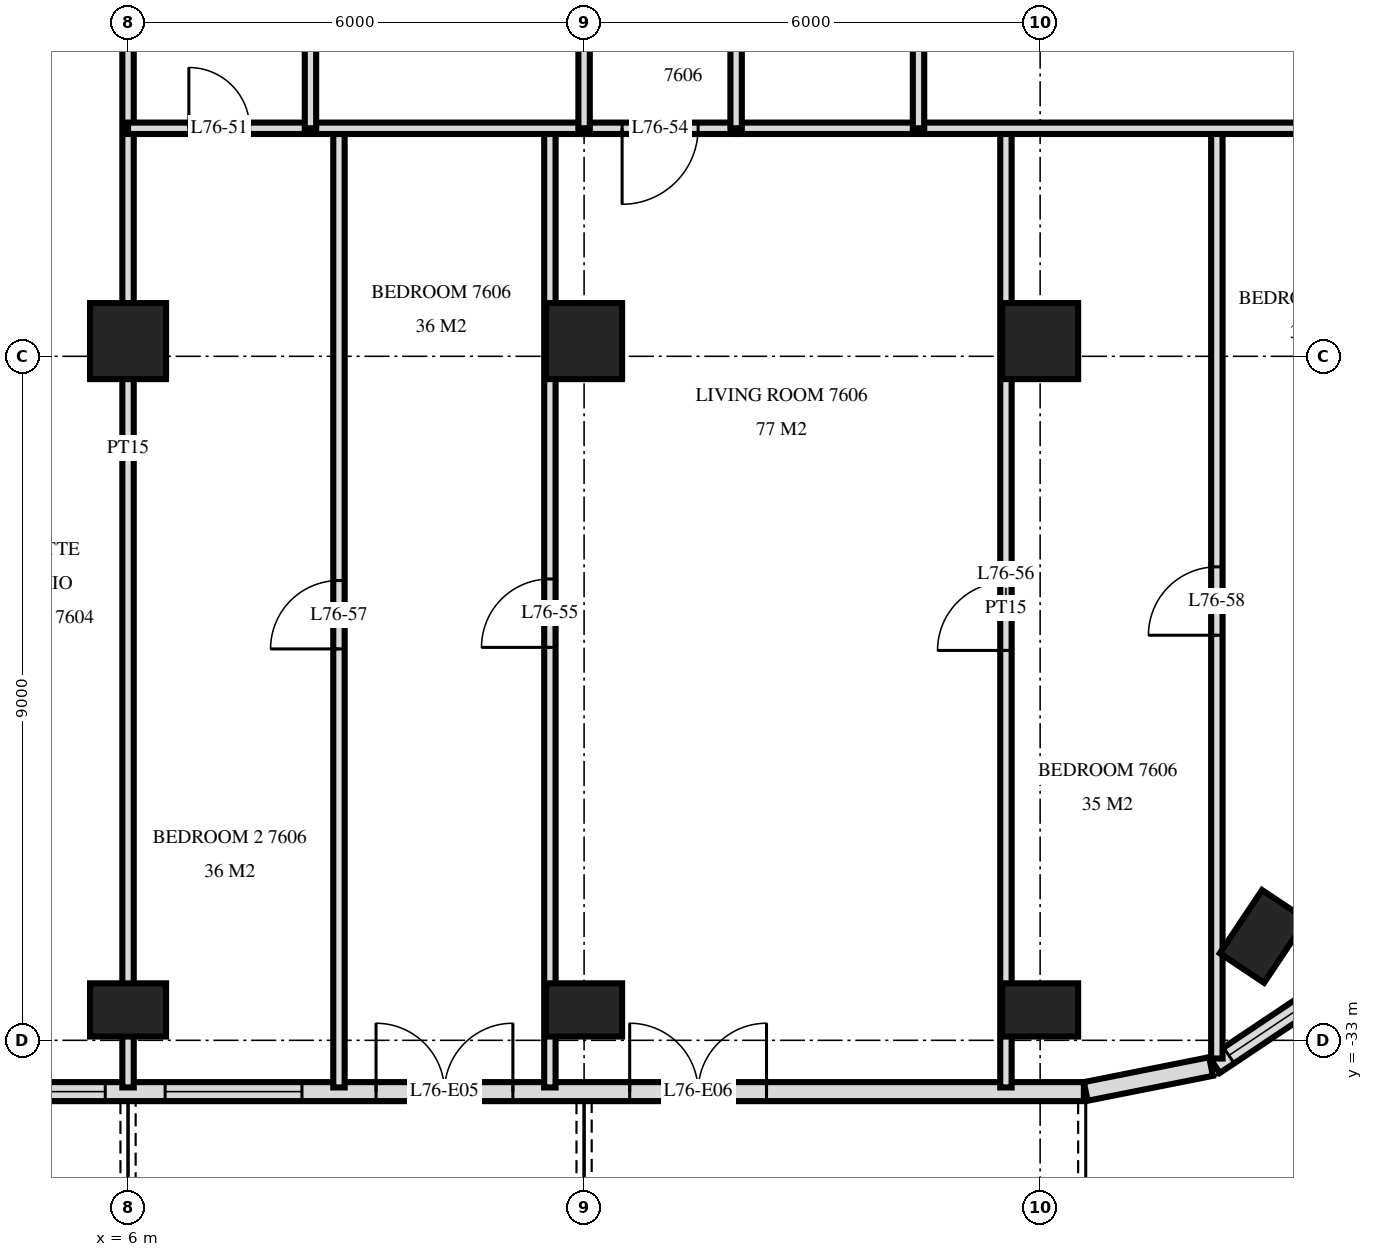
"""IFC4 building model, lengths in metres.
Left out: names, types, materials, properties, quantities, classifications, styles, units other than length and angle.
Written with IfcOpenShell. Run it as: python <this file> out.ifc"""

import sys

from ifc_helpers import new_model, si_unit, direction, frame, frame_2d, origin, origin_2d, place, context, subcontext, project, spatial, rectangle, extrude, element, fill, save


model = new_model("IFC4")
c1 = context("Model", 3, precision=1e-05, world=origin(), true_north=direction((0.0, 1.0)))
c2 = subcontext(c1, "Body", "Model", "MODEL_VIEW")
j1 = project(units=[si_unit("LENGTHUNIT", "METRE"), si_unit("PLANEANGLEUNIT", "RADIAN")], contexts=[c1])
p1 = place(None, origin())
s1 = spatial("IfcSite", under=j1, at=p1, CompositionType="ELEMENT")
p2 = place(p1, origin())
s2 = spatial("IfcBuilding", under=s1, at=p2, CompositionType="ELEMENT")
p3 = place(p2, frame((0.0, 0.0, 287.6)))
s3 = spatial("IfcBuildingStorey", under=s2, at=p3, CompositionType="ELEMENT", Elevation=287.6)
p4 = place(p3, frame((6.0, -32.6, 0.0), z_axis=(0.0, 0.0, 1.0), x_axis=(1.0, 0.0, 0.0)))
e1 = element("IfcColumn", 1, at=p4, inside=s3, PredefinedType="COLUMN", context=c2, shape_type="SweptSolid", body=[
    extrude(rectangle(XDim=1.0, YDim=0.7, at=origin_2d()), origin(), (0.0, 0.0, 1.0), 3.5),
])
p5 = place(p3, frame((6.0, -23.8, 0.0), z_axis=(0.0, 0.0, 1.0), x_axis=(1.0, 0.0, 0.0)))
e2 = element("IfcColumn", 2, at=p5, inside=s3, PredefinedType="COLUMN", context=c2, shape_type="SweptSolid", body=[
    extrude(rectangle(XDim=1.0, YDim=1.0, at=origin_2d()), origin(), (0.0, 0.0, 1.0), 3.5),
])
p6 = place(p3, frame((12.0, -32.6, 0.0), z_axis=(0.0, 0.0, 1.0), x_axis=(1.0, 0.0, 0.0)))
e3 = element("IfcColumn", 3, at=p6, inside=s3, PredefinedType="COLUMN", context=c2, shape_type="SweptSolid", body=[
    extrude(rectangle(XDim=1.0, YDim=0.7, at=origin_2d()), origin(), (0.0, 0.0, 1.0), 3.5),
])
p7 = place(p3, frame((12.0, -23.8, 0.0), z_axis=(0.0, 0.0, 1.0), x_axis=(1.0, 0.0, 0.0)))
e4 = element("IfcColumn", 4, at=p7, inside=s3, PredefinedType="COLUMN", context=c2, shape_type="SweptSolid", body=[
    extrude(rectangle(XDim=1.0, YDim=1.0, at=origin_2d()), origin(), (0.0, 0.0, 1.0), 3.5),
])
p8 = place(p3, frame((18.0, -32.6, 0.0), z_axis=(0.0, 0.0, 1.0), x_axis=(1.0, 0.0, 0.0)))
e5 = element("IfcColumn", 5, at=p8, inside=s3, PredefinedType="COLUMN", context=c2, shape_type="SweptSolid", body=[
    extrude(rectangle(XDim=1.0, YDim=0.7, at=origin_2d()), origin(), (0.0, 0.0, 1.0), 3.5),
])
p9 = place(p3, frame((18.0, -23.8, 0.0), z_axis=(0.0, 0.0, 1.0), x_axis=(1.0, 0.0, 0.0)))
e6 = element("IfcColumn", 6, at=p9, inside=s3, PredefinedType="COLUMN", context=c2, shape_type="SweptSolid", body=[
    extrude(rectangle(XDim=1.0, YDim=1.0, at=origin_2d()), origin(), (0.0, 0.0, 1.0), 3.5),
])
p10 = place(p3, frame((20.933, -31.633, 0.0), z_axis=(0.0, 0.0, 1.0), x_axis=(0.555584744817, 0.831459915646, 0.0)))
e7 = element("IfcColumn", 7, at=p10, inside=s3, PredefinedType="COLUMN", context=c2, shape_type="SweptSolid", body=[
    extrude(rectangle(XDim=1.0, YDim=0.7, at=origin_2d()), origin(), (0.0, 0.0, 1.0), 3.5),
])
p11 = place(p3, frame((-18.575, -33.675, 0.0), z_axis=(0.0, 0.0, 1.0), x_axis=(1.0, 0.0, 0.0)))
e8 = element("IfcWall", 8, at=p11, inside=s3, PredefinedType="SOLIDWALL", context=c2, shape_type="SweptSolid", body=[
    extrude(rectangle(XDim=37.151, YDim=0.25, at=frame_2d((18.575, 0.0))), origin(), (0.0, 0.0, 1.0), 3.22),
])
p12 = place(p11, frame((1.175, 0.0, 0.0)))
e9 = element("IfcOpeningElement", 9, at=p12, cuts=e8, PredefinedType="OPENING", context=c2, shape_type="SweptSolid", body=[
    extrude(rectangle(XDim=1.8, YDim=2.4, at=frame_2d((0.9, 1.2))), frame((0.0, 0.135, 0.0), z_axis=(0.0, -1.0, 0.0), x_axis=(1.0, 0.0, 0.0)), (0.0, 0.0, 1.0), 0.27),
])
p13 = place(p11, frame((4.4, 0.0, 0.9)))
e10 = element("IfcOpeningElement", 10, at=p13, cuts=e8, PredefinedType="OPENING", context=c2, shape_type="SweptSolid", body=[
    extrude(rectangle(XDim=1.8, YDim=1.5, at=frame_2d((0.9, 0.75))), frame((0.0, 0.135, 0.0), z_axis=(0.0, -1.0, 0.0), x_axis=(1.0, 0.0, 0.0)), (0.0, 0.0, 1.0), 0.27),
])
p14 = place(p11, frame((6.875, 0.0, 0.9)))
e11 = element("IfcOpeningElement", 11, at=p14, cuts=e8, PredefinedType="OPENING", context=c2, shape_type="SweptSolid", body=[
    extrude(rectangle(XDim=2.4, YDim=1.5, at=frame_2d((1.2, 0.75))), frame((0.0, 0.135, 0.0), z_axis=(0.0, -1.0, 0.0), x_axis=(1.0, 0.0, 0.0)), (0.0, 0.0, 1.0), 0.27),
])
p15 = place(p11, frame((10.175, 0.0, 0.0)))
e12 = element("IfcOpeningElement", 12, at=p15, cuts=e8, PredefinedType="OPENING", context=c2, shape_type="SweptSolid", body=[
    extrude(rectangle(XDim=1.8, YDim=2.4, at=frame_2d((0.9, 1.2))), frame((0.0, 0.135, 0.0), z_axis=(0.0, -1.0, 0.0), x_axis=(1.0, 0.0, 0.0)), (0.0, 0.0, 1.0), 0.27),
])
p16 = place(p11, frame((13.175, 0.0, 0.0)))
e13 = element("IfcOpeningElement", 13, at=p16, cuts=e8, PredefinedType="OPENING", context=c2, shape_type="SweptSolid", body=[
    extrude(rectangle(XDim=1.8, YDim=2.4, at=frame_2d((0.9, 1.2))), frame((0.0, 0.135, 0.0), z_axis=(0.0, -1.0, 0.0), x_axis=(1.0, 0.0, 0.0)), (0.0, 0.0, 1.0), 0.27),
])
p17 = place(p11, frame((15.875, 0.0, 0.9)))
e14 = element("IfcOpeningElement", 14, at=p17, cuts=e8, PredefinedType="OPENING", context=c2, shape_type="SweptSolid", body=[
    extrude(rectangle(XDim=2.4, YDim=1.5, at=frame_2d((1.2, 0.75))), frame((0.0, 0.135, 0.0), z_axis=(0.0, -1.0, 0.0), x_axis=(1.0, 0.0, 0.0)), (0.0, 0.0, 1.0), 0.27),
])
p18 = place(p11, frame((19.175, 0.0, 0.0)))
e15 = element("IfcOpeningElement", 15, at=p18, cuts=e8, PredefinedType="OPENING", context=c2, shape_type="SweptSolid", body=[
    extrude(rectangle(XDim=1.8, YDim=2.4, at=frame_2d((0.9, 1.2))), frame((0.0, 0.135, 0.0), z_axis=(0.0, -1.0, 0.0), x_axis=(1.0, 0.0, 0.0)), (0.0, 0.0, 1.0), 0.27),
])
p19 = place(p11, frame((21.875, 0.0, 0.9)))
e16 = element("IfcOpeningElement", 16, at=p19, cuts=e8, PredefinedType="OPENING", context=c2, shape_type="SweptSolid", body=[
    extrude(rectangle(XDim=2.4, YDim=1.5, at=frame_2d((1.2, 0.75))), frame((0.0, 0.135, 0.0), z_axis=(0.0, -1.0, 0.0), x_axis=(1.0, 0.0, 0.0)), (0.0, 0.0, 1.0), 0.27),
])
p20 = place(p11, frame((25.063, 0.0, 0.9)))
e17 = element("IfcOpeningElement", 17, at=p20, cuts=e8, PredefinedType="OPENING", context=c2, shape_type="SweptSolid", body=[
    extrude(rectangle(XDim=1.8, YDim=1.5, at=frame_2d((0.9, 0.75))), frame((0.0, 0.135, 0.0), z_axis=(0.0, -1.0, 0.0), x_axis=(1.0, 0.0, 0.0)), (0.0, 0.0, 1.0), 0.27),
])
p21 = place(p11, frame((27.838, 0.0, 0.0)))
e18 = element("IfcOpeningElement", 18, at=p21, cuts=e8, PredefinedType="OPENING", context=c2, shape_type="SweptSolid", body=[
    extrude(rectangle(XDim=1.8, YDim=2.4, at=frame_2d((0.9, 1.2))), frame((0.0, 0.135, 0.0), z_axis=(0.0, -1.0, 0.0), x_axis=(1.0, 0.0, 0.0)), (0.0, 0.0, 1.0), 0.27),
])
p22 = place(p11, frame((31.175, 0.0, 0.0)))
e19 = element("IfcOpeningElement", 19, at=p22, cuts=e8, PredefinedType="OPENING", context=c2, shape_type="SweptSolid", body=[
    extrude(rectangle(XDim=1.8, YDim=2.4, at=frame_2d((0.9, 1.2))), frame((0.0, 0.135, 0.0), z_axis=(0.0, -1.0, 0.0), x_axis=(1.0, 0.0, 0.0)), (0.0, 0.0, 1.0), 0.27),
])
p23 = place(p3, frame((18.6, -33.673, 0.0), z_axis=(0.0, 0.0, 1.0), x_axis=(0.980770110232, 0.195166572128, 0.0)))
e20 = element("IfcWall", 20, at=p23, inside=s3, PredefinedType="SOLIDWALL", context=c2, shape_type="SweptSolid", body=[
    extrude(rectangle(XDim=1.681, YDim=0.25, at=frame_2d((0.841, 0.0))), origin(), (0.0, 0.0, 1.0), 3.22),
])
p24 = place(p3, frame((20.294, -33.326, 0.0), z_axis=(0.0, 0.0, 1.0), x_axis=(0.831482937015, 0.55555029066, 0.0)))
e21 = element("IfcWall", 21, at=p24, inside=s3, PredefinedType="SOLIDWALL", context=c2, shape_type="SweptSolid", body=[
    extrude(rectangle(XDim=1.656, YDim=0.25, at=frame_2d((0.828, 0.0))), origin(), (0.0, 0.0, 1.0), 3.22),
])
p25 = place(p24, frame((0.228, 0.0, 0.9)))
e22 = element("IfcOpeningElement", 22, at=p25, cuts=e21, PredefinedType="OPENING", context=c2, shape_type="SweptSolid", body=[
    extrude(rectangle(XDim=1.2, YDim=1.5, at=frame_2d((0.6, 0.75))), frame((0.0, 0.135, 0.0), z_axis=(0.0, -1.0, 0.0), x_axis=(1.0, 0.0, 0.0)), (0.0, 0.0, 1.0), 0.27),
])
p26 = place(p3, frame((20.325, -33.239, 0.0), z_axis=(0.0, 0.0, 1.0), x_axis=(0.0, 1.0, 0.0)))
e23 = element("IfcWall", 23, at=p26, inside=s3, PredefinedType="PARTITIONING", context=c2, shape_type="SweptSolid", body=[
    extrude(rectangle(XDim=12.239, YDim=0.15, at=frame_2d((6.12, 0.0))), origin(), (0.0, 0.0, 1.0), 3.22),
])
p27 = place(p26, frame((5.569, 0.0, 0.0)))
e24 = element("IfcOpeningElement", 24, at=p27, cuts=e23, PredefinedType="OPENING", context=c2, shape_type="SweptSolid", body=[
    extrude(rectangle(XDim=0.9, YDim=2.1, at=frame_2d((0.45, 1.05))), frame((0.0, 0.085, 0.0), z_axis=(0.0, -1.0, 0.0), x_axis=(1.0, 0.0, 0.0)), (0.0, 0.0, 1.0), 0.17),
])
p28 = place(p3, frame((17.55, -33.62, 0.0), z_axis=(0.0, 0.0, 1.0), x_axis=(0.0, 1.0, 0.0)))
e25 = element("IfcWall", 25, at=p28, inside=s3, PredefinedType="PARTITIONING", context=c2, shape_type="SweptSolid", body=[
    extrude(rectangle(XDim=12.62, YDim=0.15, at=frame_2d((6.31, 0.0))), origin(), (0.0, 0.0, 1.0), 3.22),
])
p29 = place(p28, frame((5.75, 0.0, 0.0)))
e26 = element("IfcOpeningElement", 26, at=p29, cuts=e25, PredefinedType="OPENING", context=c2, shape_type="SweptSolid", body=[
    extrude(rectangle(XDim=0.9, YDim=2.1, at=frame_2d((0.45, 1.05))), frame((0.0, 0.085, 0.0), z_axis=(0.0, -1.0, 0.0), x_axis=(1.0, 0.0, 0.0)), (0.0, 0.0, 1.0), 0.17),
])
p30 = place(p3, frame((16.4, -21.0, 0.0), z_axis=(0.0, 0.0, 1.0), x_axis=(0.0, 1.0, 0.0)))
e27 = element("IfcWall", 27, at=p30, inside=s3, PredefinedType="PARTITIONING", context=c2, shape_type="SweptSolid", body=[
    extrude(rectangle(XDim=4.2, YDim=0.15, at=frame_2d((2.1, 0.0))), origin(), (0.0, 0.0, 1.0), 3.22),
])
p31 = place(p3, frame((14.0, -21.0, 0.0), z_axis=(0.0, 0.0, 1.0), x_axis=(0.0, 1.0, 0.0)))
e28 = element("IfcWall", 28, at=p31, inside=s3, PredefinedType="PARTITIONING", context=c2, shape_type="SweptSolid", body=[
    extrude(rectangle(XDim=4.2, YDim=0.15, at=frame_2d((2.1, 0.0))), origin(), (0.0, 0.0, 1.0), 3.22),
])
p32 = place(p31, frame((1.6, 0.0, 0.0)))
e29 = element("IfcOpeningElement", 29, at=p32, cuts=e28, PredefinedType="OPENING", context=c2, shape_type="SweptSolid", body=[
    extrude(rectangle(XDim=1.0, YDim=2.1, at=frame_2d((0.5, 1.05))), frame((0.0, 0.085, 0.0), z_axis=(0.0, -1.0, 0.0), x_axis=(1.0, 0.0, 0.0)), (0.0, 0.0, 1.0), 0.17),
])
p33 = place(p3, frame((12.0, -21.0, 0.0), z_axis=(0.0, 0.0, 1.0), x_axis=(0.0, 1.0, 0.0)))
e30 = element("IfcWall", 30, at=p33, inside=s3, PredefinedType="PARTITIONING", context=c2, shape_type="SweptSolid", body=[
    extrude(rectangle(XDim=4.2, YDim=0.15, at=frame_2d((2.1, 0.0))), origin(), (0.0, 0.0, 1.0), 3.22),
])
p34 = place(p33, frame((1.6, 0.0, 0.0)))
e31 = element("IfcOpeningElement", 31, at=p34, cuts=e30, PredefinedType="OPENING", context=c2, shape_type="SweptSolid", body=[
    extrude(rectangle(XDim=1.0, YDim=2.1, at=frame_2d((0.5, 1.05))), frame((0.0, 0.085, 0.0), z_axis=(0.0, -1.0, 0.0), x_axis=(1.0, 0.0, 0.0)), (0.0, 0.0, 1.0), 0.17),
])
p35 = place(p3, frame((11.55, -33.62, 0.0), z_axis=(0.0, 0.0, 1.0), x_axis=(0.0, 1.0, 0.0)))
e32 = element("IfcWall", 32, at=p35, inside=s3, PredefinedType="PARTITIONING", context=c2, shape_type="SweptSolid", body=[
    extrude(rectangle(XDim=12.62, YDim=0.15, at=frame_2d((6.31, 0.0))), origin(), (0.0, 0.0, 1.0), 3.22),
])
p36 = place(p35, frame((5.79, 0.0, 0.0)))
e33 = element("IfcOpeningElement", 33, at=p36, cuts=e32, PredefinedType="OPENING", context=c2, shape_type="SweptSolid", body=[
    extrude(rectangle(XDim=0.9, YDim=2.1, at=frame_2d((0.45, 1.05))), frame((0.0, 0.085, 0.0), z_axis=(0.0, -1.0, 0.0), x_axis=(1.0, 0.0, 0.0)), (0.0, 0.0, 1.0), 0.17),
])
p37 = place(p3, frame((8.775, -33.62, 0.0), z_axis=(0.0, 0.0, 1.0), x_axis=(0.0, 1.0, 0.0)))
e34 = element("IfcWall", 34, at=p37, inside=s3, PredefinedType="PARTITIONING", context=c2, shape_type="SweptSolid", body=[
    extrude(rectangle(XDim=12.62, YDim=0.15, at=frame_2d((6.31, 0.0))), origin(), (0.0, 0.0, 1.0), 3.22),
])
p38 = place(p37, frame((5.77, 0.0, 0.0)))
e35 = element("IfcOpeningElement", 35, at=p38, cuts=e34, PredefinedType="OPENING", context=c2, shape_type="SweptSolid", body=[
    extrude(rectangle(XDim=0.9, YDim=2.1, at=frame_2d((0.45, 1.05))), frame((0.0, 0.085, 0.0), z_axis=(0.0, -1.0, 0.0), x_axis=(1.0, 0.0, 0.0)), (0.0, 0.0, 1.0), 0.17),
])
p39 = place(p3, frame((8.4, -21.0, 0.0), z_axis=(0.0, 0.0, 1.0), x_axis=(0.0, 1.0, 0.0)))
e36 = element("IfcWall", 36, at=p39, inside=s3, PredefinedType="PARTITIONING", context=c2, shape_type="SweptSolid", body=[
    extrude(rectangle(XDim=4.2, YDim=0.15, at=frame_2d((2.1, 0.0))), origin(), (0.0, 0.0, 1.0), 3.22),
])
p40 = place(p3, frame((6.0, -33.62, 0.0), z_axis=(0.0, 0.0, 1.0), x_axis=(0.0, 1.0, 0.0)))
e37 = element("IfcWall", 37, at=p40, inside=s3, PredefinedType="PARTITIONING", context=c2, shape_type="SweptSolid", body=[
    extrude(rectangle(XDim=16.82, YDim=0.15, at=frame_2d((8.41, 0.0))), origin(), (0.0, 0.0, 1.0), 3.22),
])
p41 = place(p3, frame((12.0, -21.0, 0.0), z_axis=(0.0, 0.0, 1.0), x_axis=(1.0, 0.0, 0.0)))
e38 = element("IfcWall", 38, at=p41, inside=s3, PredefinedType="PARTITIONING", context=c2, shape_type="SweptSolid", body=[
    extrude(rectangle(XDim=2.0, YDim=0.15, at=frame_2d((1.0, 0.0))), origin(), (0.0, 0.0, 1.0), 3.22),
])
p42 = place(p41, frame((0.5, 0.0, 0.0)))
e39 = element("IfcOpeningElement", 39, at=p42, cuts=e38, PredefinedType="OPENING", context=c2, shape_type="SweptSolid", body=[
    extrude(rectangle(XDim=1.0, YDim=2.1, at=frame_2d((0.5, 1.05))), frame((0.0, 0.085, 0.0), z_axis=(0.0, -1.0, 0.0), x_axis=(1.0, 0.0, 0.0)), (0.0, 0.0, 1.0), 0.17),
])
p43 = place(p3, frame((6.0, -21.0, 0.0), z_axis=(0.0, 0.0, 1.0), x_axis=(1.0, 0.0, 0.0)))
e40 = element("IfcWall", 40, at=p43, inside=s3, PredefinedType="PARTITIONING", context=c2, shape_type="SweptSolid", body=[
    extrude(rectangle(XDim=6.0, YDim=0.15, at=frame_2d((3.0, 0.0))), origin(), (0.0, 0.0, 1.0), 3.22),
])
p44 = place(p43, frame((0.8, 0.0, 0.0)))
e41 = element("IfcOpeningElement", 41, at=p44, cuts=e40, PredefinedType="OPENING", context=c2, shape_type="SweptSolid", body=[
    extrude(rectangle(XDim=0.8, YDim=2.1, at=frame_2d((0.4, 1.05))), frame((0.0, 0.085, 0.0), z_axis=(0.0, -1.0, 0.0), x_axis=(1.0, 0.0, 0.0)), (0.0, 0.0, 1.0), 0.17),
])
p45 = place(p3, frame((14.0, -21.0, 0.0), z_axis=(0.0, 0.0, 1.0), x_axis=(1.0, 0.0, 0.0)))
e42 = element("IfcWall", 42, at=p45, inside=s3, PredefinedType="PARTITIONING", context=c2, shape_type="SweptSolid", body=[
    extrude(rectangle(XDim=8.92, YDim=0.15, at=frame_2d((4.46, 0.0))), origin(), (0.0, 0.0, 1.0), 3.22),
])
p46 = place(p25, origin())
e43 = element("IfcWindow", 43, at=p46, inside=s3, PartitioningType="SINGLE_PANEL", PredefinedType="WINDOW", context=c2, shape_type="SweptSolid", body=[
    extrude(rectangle(XDim=1.2, YDim=1.5, at=frame_2d((0.6, 0.75))), frame((0.0, 0.03, 0.0), z_axis=(0.0, -1.0, 0.0), x_axis=(1.0, 0.0, 0.0)), (0.0, 0.0, 1.0), 0.06),
])
fill(e22, e43)
p47 = place(p19, origin())
e44 = element("IfcWindow", 44, at=p47, inside=s3, PartitioningType="SINGLE_PANEL", PredefinedType="WINDOW", context=c2, shape_type="SweptSolid", body=[
    extrude(rectangle(XDim=2.4, YDim=1.5, at=frame_2d((1.2, 0.75))), frame((0.0, 0.03, 0.0), z_axis=(0.0, -1.0, 0.0), x_axis=(1.0, 0.0, 0.0)), (0.0, 0.0, 1.0), 0.06),
])
fill(e16, e44)
p48 = place(p20, origin())
e45 = element("IfcWindow", 45, at=p48, inside=s3, PartitioningType="SINGLE_PANEL", PredefinedType="WINDOW", context=c2, shape_type="SweptSolid", body=[
    extrude(rectangle(XDim=1.8, YDim=1.5, at=frame_2d((0.9, 0.75))), frame((0.0, 0.03, 0.0), z_axis=(0.0, -1.0, 0.0), x_axis=(1.0, 0.0, 0.0)), (0.0, 0.0, 1.0), 0.06),
])
fill(e17, e45)
p49 = place(p21, origin())
e46 = element("IfcDoor", 46, at=p49, inside=s3, OperationType="DOUBLE_DOOR_SINGLE_SWING", PredefinedType="DOOR", context=c2, shape_type="SweptSolid", body=[
    extrude(rectangle(XDim=1.8, YDim=2.4, at=frame_2d((0.9, 1.2))), frame((0.0, 0.025, 0.0), z_axis=(0.0, -1.0, 0.0), x_axis=(1.0, 0.0, 0.0)), (0.0, 0.0, 1.0), 0.05),
])
fill(e18, e46)
p50 = place(p22, origin())
e47 = element("IfcDoor", 47, at=p50, inside=s3, OperationType="DOUBLE_DOOR_SINGLE_SWING", PredefinedType="DOOR", context=c2, shape_type="SweptSolid", body=[
    extrude(rectangle(XDim=1.8, YDim=2.4, at=frame_2d((0.9, 1.2))), frame((0.0, 0.025, 0.0), z_axis=(0.0, -1.0, 0.0), x_axis=(1.0, 0.0, 0.0)), (0.0, 0.0, 1.0), 0.05),
])
fill(e19, e47)
p51 = place(p44, origin())
e48 = element("IfcDoor", 48, at=p51, inside=s3, OperationType="SINGLE_SWING_RIGHT", PredefinedType="DOOR", context=c2, shape_type="SweptSolid", body=[
    extrude(rectangle(XDim=0.8, YDim=2.1, at=frame_2d((0.4, 1.05))), frame((0.0, 0.025, 0.0), z_axis=(0.0, -1.0, 0.0), x_axis=(1.0, 0.0, 0.0)), (0.0, 0.0, 1.0), 0.05),
])
fill(e41, e48)
p52 = place(p42, frame((0.5, 0.0, 0.0), z_axis=(0.0, 0.0, 1.0), x_axis=(-1.0, 0.0, 0.0)))
e49 = element("IfcDoor", 49, at=p52, inside=s3, OperationType="SINGLE_SWING_LEFT", PredefinedType="DOOR", context=c2, shape_type="SweptSolid", body=[
    extrude(rectangle(XDim=1.0, YDim=2.1, at=frame_2d((0.0, 1.05))), frame((0.0, -0.025, 0.0), z_axis=(0.0, 1.0, 0.0), x_axis=(-1.0, 0.0, 0.0)), (0.0, 0.0, 1.0), 0.05),
])
fill(e39, e49)
p53 = place(p36, origin())
e50 = element("IfcDoor", 50, at=p53, inside=s3, OperationType="SINGLE_SWING_RIGHT", PredefinedType="DOOR", context=c2, shape_type="SweptSolid", body=[
    extrude(rectangle(XDim=0.9, YDim=2.1, at=frame_2d((0.45, 1.05))), frame((0.0, 0.025, 0.0), z_axis=(0.0, -1.0, 0.0), x_axis=(1.0, 0.0, 0.0)), (0.0, 0.0, 1.0), 0.05),
])
fill(e33, e50)
p54 = place(p29, origin())
e51 = element("IfcDoor", 51, at=p54, inside=s3, OperationType="SINGLE_SWING_RIGHT", PredefinedType="DOOR", context=c2, shape_type="SweptSolid", body=[
    extrude(rectangle(XDim=0.9, YDim=2.1, at=frame_2d((0.45, 1.05))), frame((0.0, 0.025, 0.0), z_axis=(0.0, -1.0, 0.0), x_axis=(1.0, 0.0, 0.0)), (0.0, 0.0, 1.0), 0.05),
])
fill(e26, e51)
p55 = place(p38, origin())
e52 = element("IfcDoor", 52, at=p55, inside=s3, OperationType="SINGLE_SWING_RIGHT", PredefinedType="DOOR", context=c2, shape_type="SweptSolid", body=[
    extrude(rectangle(XDim=0.9, YDim=2.1, at=frame_2d((0.45, 1.05))), frame((0.0, 0.025, 0.0), z_axis=(0.0, -1.0, 0.0), x_axis=(1.0, 0.0, 0.0)), (0.0, 0.0, 1.0), 0.05),
])
fill(e35, e52)
p56 = place(p27, origin())
e53 = element("IfcDoor", 53, at=p56, inside=s3, OperationType="SINGLE_SWING_RIGHT", PredefinedType="DOOR", context=c2, shape_type="SweptSolid", body=[
    extrude(rectangle(XDim=0.9, YDim=2.1, at=frame_2d((0.45, 1.05))), frame((0.0, 0.025, 0.0), z_axis=(0.0, -1.0, 0.0), x_axis=(1.0, 0.0, 0.0)), (0.0, 0.0, 1.0), 0.05),
])
fill(e24, e53)
save(model, sys.argv[1])
